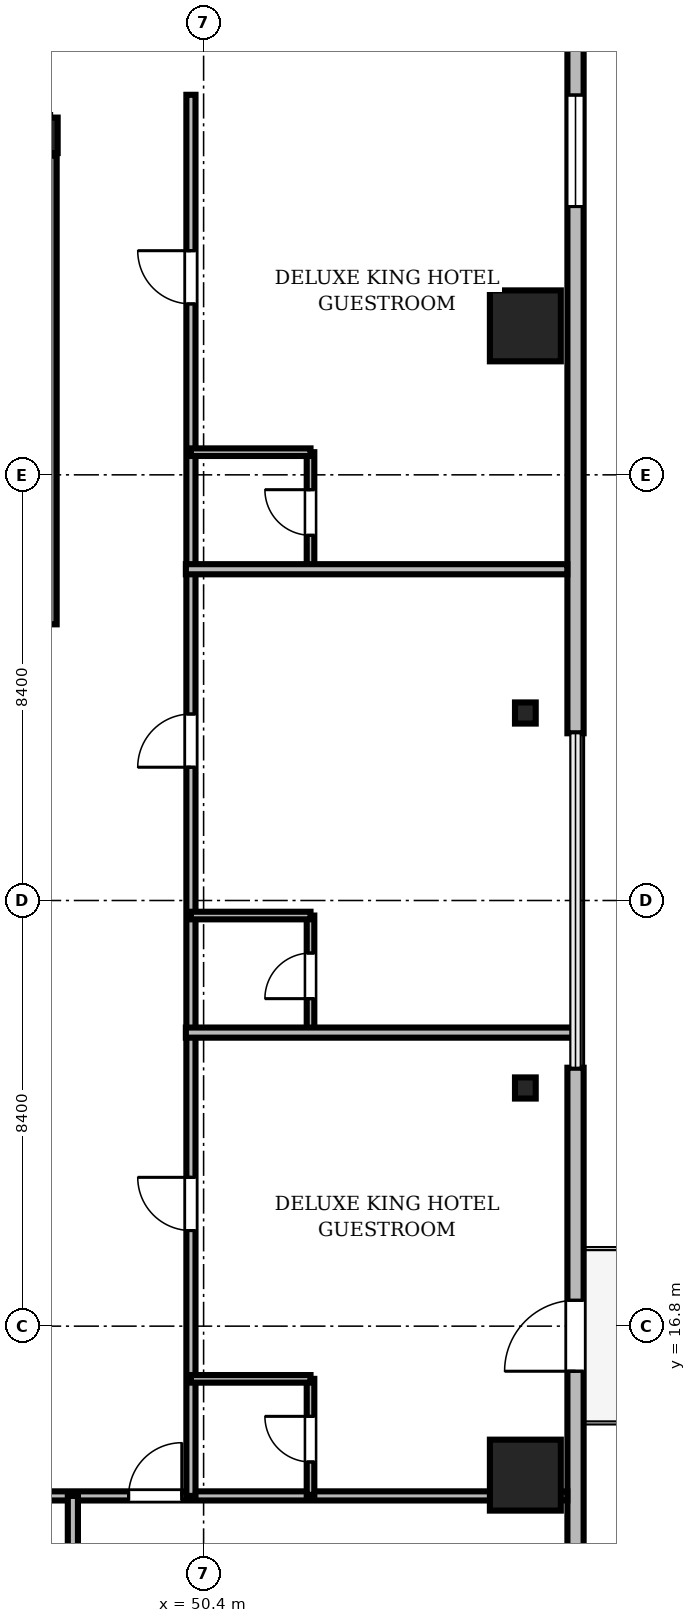
"""IFC4 building model, lengths in metres.
Left out: names, types, materials, properties, quantities, classifications, styles, units other than length and angle.
Written with IfcOpenShell. Run it as: python <this file> out.ifc"""

import sys

from ifc_helpers import new_model, si_unit, direction, frame, frame_2d, origin, origin_2d, place, context, subcontext, project, spatial, rectangle, i_section, extrude, source, transform, mapped, element, fill, save


model = new_model("IFC4")
c1 = context("Model", 3, precision=1e-05, world=origin(), true_north=direction((0.0, 1.0)))
c2 = subcontext(c1, "Body", "Model", "MODEL_VIEW")
j1 = project(units=[si_unit("LENGTHUNIT", "METRE"), si_unit("PLANEANGLEUNIT", "RADIAN")], contexts=[c1])
p1 = place(None, origin())
s1 = spatial("IfcSite", under=j1, at=p1, CompositionType="ELEMENT")
p2 = place(p1, origin())
s2 = spatial("IfcBuilding", under=s1, at=p2, CompositionType="ELEMENT")
p3 = place(p2, frame((0.0, 0.0, 207.3)))
s3 = spatial("IfcBuildingStorey", under=s2, at=p3, CompositionType="ELEMENT", Elevation=207.3)
m1 = source(origin(), c2, "Body", "SweptSolid", [
    extrude(i_section(OverallWidth=0.3, OverallDepth=0.7, WebThickness=0.017, FlangeThickness=0.032, FilletRadius=0.027, at=origin_2d()), origin(), (0.0, 0.0, 1.0), 3.53),
])
p4 = place(p3, frame((47.37, 40.3, 0.0), z_axis=(0.0, 0.0, 1.0), x_axis=(1.0, 0.0, 0.0)))
e1 = element("IfcColumn", 1, at=p4, inside=s3, PredefinedType="COLUMN", context=c2, shape_type="MappedRepresentation", body=[
    mapped(m1, transform((0.0, 0.0, 0.0), scale=1.0)),
])
m2 = source(origin(), c2, "Body", "SweptSolid", [
    extrude(rectangle(XDim=1.4, YDim=1.4, at=origin_2d()), origin(), (0.0, 0.0, 1.0), 3.53),
])
for number, where, z_axis, x_axis in (
    (2, (56.75, 13.86, 0.0), (0.0, 0.0, 1.0), (1.0, 0.0, 0.0)),
    (3, (56.75, 36.54, 0.0), (0.0, 0.0, 1.0), (1.0, 0.0, 0.0)),
):
    element("IfcColumn", number, at=place(p3, frame(where, z_axis=z_axis, x_axis=x_axis)), inside=s3, PredefinedType="COLUMN", context=c2, shape_type="MappedRepresentation", body=[
        mapped(m2, transform((0.0, 0.0, 0.0), scale=1.0)),
    ])
m3 = source(origin(), c2, "Body", "SweptSolid", [
    extrude(i_section(OverallWidth=0.409, OverallDepth=0.417, WebThickness=0.021, FlangeThickness=0.033, FilletRadius=0.015, at=origin_2d()), origin(), (0.0, 0.0, 1.0), 3.53),
])
for number, where, z_axis, x_axis in (
    (4, (56.75, 21.5, 0.0), (0.0, 0.0, 1.0), (1.0, 0.0, 0.0)),
    (5, (56.75, 28.9, 0.0), (0.0, 0.0, 1.0), (1.0, 0.0, 0.0)),
):
    element("IfcColumn", number, at=place(p3, frame(where, z_axis=z_axis, x_axis=x_axis)), inside=s3, PredefinedType="COLUMN", context=c2, shape_type="MappedRepresentation", body=[
        mapped(m3, transform((0.0, 0.0, 0.0), scale=1.0)),
    ])
m4 = source(origin(), c2, "Body", "SweptSolid", [
    extrude(rectangle(XDim=15.6, YDim=0.32, at=frame_2d((7.8, 0.0))), origin(), (0.0, 0.0, 1.0), 3.53),
])
p5 = place(p3, frame((57.74, 6.3, 0.0), z_axis=(0.0, 0.0, 1.0), x_axis=(0.0, 1.0, 0.0)))
e6 = element("IfcWall", 6, at=p5, inside=s3, PredefinedType="SOLIDWALL", context=c2, shape_type="MappedRepresentation", body=[
    mapped(m4, transform((0.0, 0.0, 0.0), scale=1.0)),
])
m5 = source(origin(), c2, "Body", "SweptSolid", [
    extrude(rectangle(XDim=1.4, YDim=2.3, at=frame_2d((0.7, 1.15))), frame((0.0, 0.17, 0.0), z_axis=(0.0, -1.0, 0.0), x_axis=(1.0, 0.0, 0.0)), (0.0, 0.0, 1.0), 0.34),
])
p6 = place(p5, frame((9.61, 0.0, 0.0)))
e7 = element("IfcOpeningElement", 7, at=p6, cuts=e6, PredefinedType="OPENING", context=c2, shape_type="MappedRepresentation", body=[
    mapped(m5, transform((0.0, 0.0, 0.0), scale=1.0)),
])
m6 = source(origin(), c2, "Body", "SweptSolid", [
    extrude(rectangle(XDim=2.2, YDim=2.4, at=frame_2d((1.1, 1.2))), frame((0.0, 0.17, 0.0), z_axis=(0.0, -1.0, 0.0), x_axis=(1.0, 0.0, 0.0)), (0.0, 0.0, 1.0), 0.34),
])
p7 = place(p5, frame((3.005, 0.0, 0.72)))
e8 = element("IfcOpeningElement", 8, at=p7, cuts=e6, PredefinedType="OPENING", context=c2, shape_type="MappedRepresentation", body=[
    mapped(m6, transform((0.0, 0.0, 0.0), scale=1.0)),
])
m7 = source(origin(), c2, "Body", "SweptSolid", [
    extrude(rectangle(XDim=15.6, YDim=0.32, at=frame_2d((7.8, 0.0))), origin(), (0.0, 0.0, 1.0), 3.53),
])
p8 = place(p3, frame((57.74, 28.5, 0.0), z_axis=(0.0, 0.0, 1.0), x_axis=(0.0, 1.0, 0.0)))
e9 = element("IfcWall", 9, at=p8, inside=s3, PredefinedType="SOLIDWALL", context=c2, shape_type="MappedRepresentation", body=[
    mapped(m7, transform((0.0, 0.0, 0.0), scale=1.0)),
])
p9 = place(p8, frame((10.395, 0.0, 0.72)))
e10 = element("IfcOpeningElement", 10, at=p9, cuts=e9, PredefinedType="OPENING", context=c2, shape_type="MappedRepresentation", body=[
    mapped(m6, transform((0.0, 0.0, 0.0), scale=1.0)),
])
m8 = source(origin(), c2, "Body", "SweptSolid", [
    extrude(rectangle(XDim=9.25, YDim=0.25, at=frame_2d((4.625, 0.0))), origin(), (0.0, 0.0, 1.0), 3.55),
])
p10 = place(p3, frame((47.375, 30.65, 0.0), z_axis=(0.0, 0.0, 1.0), x_axis=(0.0, 1.0, 0.0)))
e11 = element("IfcWall", 11, at=p10, inside=s3, PredefinedType="SOLIDWALL", context=c2, shape_type="MappedRepresentation", body=[
    mapped(m8, transform((0.0, 0.0, 0.0), scale=1.0)),
])
m9 = source(origin(), c2, "Body", "SweptSolid", [
    extrude(rectangle(XDim=46.156, YDim=0.18, at=frame_2d((23.078, 0.0))), origin(), (0.0, 0.0, 1.0), 2.772),
])
p11 = place(p3, frame((11.422, 13.45, 0.0), z_axis=(0.0, 0.0, 1.0), x_axis=(1.0, 0.0, 0.0)))
e12 = element("IfcWall", 12, at=p11, inside=s3, PredefinedType="PARTITIONING", context=c2, shape_type="MappedRepresentation", body=[
    mapped(m9, transform((0.0, 0.0, 0.0), scale=1.0)),
])
m10 = source(origin(), c2, "Body", "SweptSolid", [
    extrude(rectangle(XDim=1.05, YDim=2.2, at=frame_2d((0.525, 1.1))), frame((0.0, 0.1, 0.0), z_axis=(0.0, -1.0, 0.0), x_axis=(1.0, 0.0, 0.0)), (0.0, 0.0, 1.0), 0.2),
])
p12 = place(p11, frame((11.118, 0.0, 0.0)))
e13 = element("IfcOpeningElement", 13, at=p12, cuts=e12, PredefinedType="OPENING", context=c2, shape_type="MappedRepresentation", body=[
    mapped(m10, transform((0.0, 0.0, 0.0), scale=1.0)),
])
p13 = place(p11, frame((14.939, 0.0, 0.0)))
e14 = element("IfcOpeningElement", 14, at=p13, cuts=e12, PredefinedType="OPENING", context=c2, shape_type="MappedRepresentation", body=[
    mapped(m10, transform((0.0, 0.0, 0.0), scale=1.0)),
])
p14 = place(p11, frame((20.922, 0.0, 0.0)))
e15 = element("IfcOpeningElement", 15, at=p14, cuts=e12, PredefinedType="OPENING", context=c2, shape_type="MappedRepresentation", body=[
    mapped(m10, transform((0.0, 0.0, 0.0), scale=1.0)),
])
p15 = place(p11, frame((26.904, 0.0, 0.0)))
e16 = element("IfcOpeningElement", 16, at=p15, cuts=e12, PredefinedType="OPENING", context=c2, shape_type="MappedRepresentation", body=[
    mapped(m10, transform((0.0, 0.0, 0.0), scale=1.0)),
])
p16 = place(p11, frame((32.887, 0.0, 0.0)))
e17 = element("IfcOpeningElement", 17, at=p16, cuts=e12, PredefinedType="OPENING", context=c2, shape_type="MappedRepresentation", body=[
    mapped(m10, transform((0.0, 0.0, 0.0), scale=1.0)),
])
p17 = place(p11, frame((37.498, 0.0, 0.0)))
e18 = element("IfcOpeningElement", 18, at=p17, cuts=e12, PredefinedType="OPENING", context=c2, shape_type="MappedRepresentation", body=[
    mapped(m10, transform((0.0, 0.0, 0.0), scale=1.0)),
])
m11 = source(origin(), c2, "Body", "SweptSolid", [
    extrude(rectangle(XDim=27.65, YDim=0.18, at=frame_2d((13.825, 0.0))), origin(), (0.0, 0.0, 1.0), 2.972),
])
p18 = place(p3, frame((50.15, 13.45, 0.0), z_axis=(0.0, 0.0, 1.0), x_axis=(0.0, 1.0, 0.0)))
e19 = element("IfcWall", 19, at=p18, inside=s3, PredefinedType="PARTITIONING", context=c2, shape_type="MappedRepresentation", body=[
    mapped(m11, transform((0.0, 0.0, 0.0), scale=1.0)),
])
p19 = place(p18, frame((5.237, 0.0, 0.0)))
e20 = element("IfcOpeningElement", 20, at=p19, cuts=e19, PredefinedType="OPENING", context=c2, shape_type="MappedRepresentation", body=[
    mapped(m10, transform((0.0, 0.0, 0.0), scale=1.0)),
])
p20 = place(p18, frame((14.38, 0.0, 0.0)))
e21 = element("IfcOpeningElement", 21, at=p20, cuts=e19, PredefinedType="OPENING", context=c2, shape_type="MappedRepresentation", body=[
    mapped(m10, transform((0.0, 0.0, 0.0), scale=1.0)),
])
p21 = place(p18, frame((23.523, 0.0, 0.0)))
e22 = element("IfcOpeningElement", 22, at=p21, cuts=e19, PredefinedType="OPENING", context=c2, shape_type="MappedRepresentation", body=[
    mapped(m10, transform((0.0, 0.0, 0.0), scale=1.0)),
])
m12 = source(origin(), c2, "Body", "SweptSolid", [
    extrude(rectangle(XDim=2.29, YDim=0.15, at=frame_2d((1.145, 0.0))), origin(), (0.0, 0.0, 1.0), 2.972),
])
p22 = place(p3, frame((52.51, 13.47, 0.0), z_axis=(0.0, 0.0, 1.0), x_axis=(0.0, 1.0, 0.0)))
e23 = element("IfcWall", 23, at=p22, inside=s3, PredefinedType="PARTITIONING", context=c2, shape_type="MappedRepresentation", body=[
    mapped(m12, transform((0.0, 0.0, 0.0), scale=1.0)),
])
m13 = source(origin(), c2, "Body", "SweptSolid", [
    extrude(rectangle(XDim=0.9, YDim=2.1, at=frame_2d((0.45, 1.05))), frame((0.0, 0.085, 0.0), z_axis=(0.0, -1.0, 0.0), x_axis=(1.0, 0.0, 0.0)), (0.0, 0.0, 1.0), 0.17),
])
p23 = place(p22, frame((0.65, 0.0, 0.0)))
e24 = element("IfcOpeningElement", 24, at=p23, cuts=e23, PredefinedType="OPENING", context=c2, shape_type="MappedRepresentation", body=[
    mapped(m13, transform((0.0, 0.0, 0.0), scale=1.0)),
])
m14 = source(origin(), c2, "Body", "SweptSolid", [
    extrude(rectangle(XDim=2.29, YDim=0.15, at=frame_2d((1.145, 0.0))), origin(), (0.0, 0.0, 1.0), 3.192),
])
p24 = place(p3, frame((52.51, 22.613, 0.0), z_axis=(0.0, 0.0, 1.0), x_axis=(0.0, 1.0, 0.0)))
e25 = element("IfcWall", 25, at=p24, inside=s3, PredefinedType="PARTITIONING", context=c2, shape_type="MappedRepresentation", body=[
    mapped(m14, transform((0.0, 0.0, 0.0), scale=1.0)),
])
p25 = place(p24, frame((0.65, 0.0, 0.0)))
e26 = element("IfcOpeningElement", 26, at=p25, cuts=e25, PredefinedType="OPENING", context=c2, shape_type="MappedRepresentation", body=[
    mapped(m13, transform((0.0, 0.0, 0.0), scale=1.0)),
])
m15 = source(origin(), c2, "Body", "SweptSolid", [
    extrude(rectangle(XDim=2.29, YDim=0.15, at=frame_2d((1.145, 0.0))), origin(), (0.0, 0.0, 1.0), 3.53),
])
p26 = place(p3, frame((52.51, 31.757, 0.0), z_axis=(0.0, 0.0, 1.0), x_axis=(0.0, 1.0, 0.0)))
e27 = element("IfcWall", 27, at=p26, inside=s3, PredefinedType="PARTITIONING", context=c2, shape_type="MappedRepresentation", body=[
    mapped(m15, transform((0.0, 0.0, 0.0), scale=1.0)),
])
p27 = place(p26, frame((0.65, 0.0, 0.0)))
e28 = element("IfcOpeningElement", 28, at=p27, cuts=e27, PredefinedType="OPENING", context=c2, shape_type="MappedRepresentation", body=[
    mapped(m13, transform((0.0, 0.0, 0.0), scale=1.0)),
])
m16 = source(origin(), c2, "Body", "SweptSolid", [
    extrude(rectangle(XDim=11.328, YDim=0.2, at=frame_2d((5.664, 0.0))), origin(), (0.0, 0.0, 1.0), 2.772),
])
p28 = place(p3, frame((47.82, 2.122, 0.0), z_axis=(0.0, 0.0, 1.0), x_axis=(0.0, 1.0, 0.0)))
e29 = element("IfcWall", 29, at=p28, inside=s3, PredefinedType="PARTITIONING", context=c2, shape_type="MappedRepresentation", body=[
    mapped(m16, transform((0.0, 0.0, 0.0), scale=1.0)),
])
m17 = source(origin(), c2, "Body", "SweptSolid", [
    extrude(rectangle(XDim=7.72, YDim=0.2, at=frame_2d((3.86, 0.0))), origin(), (0.0, 0.0, 1.0), 2.772),
])
p29 = place(p3, frame((50.05, 22.593, 0.0), z_axis=(0.0, 0.0, 1.0), x_axis=(1.0, 0.0, 0.0)))
e30 = element("IfcWall", 30, at=p29, inside=s3, PredefinedType="PARTITIONING", context=c2, shape_type="MappedRepresentation", body=[
    mapped(m17, transform((0.0, 0.0, 0.0), scale=1.0)),
])
m18 = source(origin(), c2, "Body", "SweptSolid", [
    extrude(rectangle(XDim=7.528, YDim=0.2, at=frame_2d((3.764, 0.0))), origin(), (0.0, 0.0, 1.0), 2.772),
])
p30 = place(p3, frame((50.05, 31.737, 0.0), z_axis=(0.0, 0.0, 1.0), x_axis=(1.0, 0.0, 0.0)))
e31 = element("IfcWall", 31, at=p30, inside=s3, PredefinedType="PARTITIONING", context=c2, shape_type="MappedRepresentation", body=[
    mapped(m18, transform((0.0, 0.0, 0.0), scale=1.0)),
])
m19 = source(origin(), c2, "Body", "SweptSolid", [
    extrude(rectangle(XDim=2.36, YDim=0.15, at=frame_2d((1.18, 0.0))), origin(), (0.0, 0.0, 1.0), 3.53),
])
for number, where, z_axis, x_axis in (
    (32, (50.15, 15.76, 0.0), (0.0, 0.0, 1.0), (1.0, 0.0, 0.0)),
    (33, (50.15, 24.903, 0.0), (0.0, 0.0, 1.0), (1.0, 0.0, 0.0)),
    (34, (50.15, 34.047, 0.0), (0.0, 0.0, 1.0), (1.0, 0.0, 0.0)),
):
    element("IfcWall", number, at=place(p3, frame(where, z_axis=z_axis, x_axis=x_axis)), inside=s3, PredefinedType="PARTITIONING", context=c2, shape_type="MappedRepresentation", body=[
        mapped(m19, transform((0.0, 0.0, 0.0), scale=1.0)),
    ])
m20 = source(origin(), c2, "Body", "SweptSolid", [
    extrude(rectangle(XDim=1.4, YDim=2.3, at=frame_2d((0.7, 1.15))), frame((0.0, 0.025, 0.0), z_axis=(0.0, -1.0, 0.0), x_axis=(1.0, 0.0, 0.0)), (0.0, 0.0, 1.0), 0.05),
])
p31 = place(p6, frame((1.4, 0.0, 0.0), z_axis=(0.0, 0.0, 1.0), x_axis=(-1.0, 0.0, 0.0)))
e35 = element("IfcDoor", 35, at=p31, inside=s3, OperationType="DOUBLE_DOOR_SLIDING", PredefinedType="DOOR", context=c2, shape_type="MappedRepresentation", body=[
    mapped(m20, transform((0.0, 0.0, 0.0), scale=1.0)),
])
fill(e7, e35)
m21 = source(origin(), c2, "Body", "SweptSolid", [
    extrude(rectangle(XDim=2.2, YDim=2.4, at=frame_2d((1.1, 1.2))), frame((0.0, 0.03, 0.0), z_axis=(0.0, -1.0, 0.0), x_axis=(1.0, 0.0, 0.0)), (0.0, 0.0, 1.0), 0.06),
])
p32 = place(p9, origin())
e36 = element("IfcWindow", 36, at=p32, inside=s3, PartitioningType="SINGLE_PANEL", PredefinedType="WINDOW", context=c2, shape_type="MappedRepresentation", body=[
    mapped(m21, transform((0.0, 0.0, 0.0), scale=1.0)),
])
fill(e10, e36)
m22 = source(origin(), c2, "Body", "SweptSolid", [
    extrude(rectangle(XDim=1.05, YDim=2.2, at=frame_2d((0.525, 1.1))), frame((0.0, 0.025, 0.0), z_axis=(0.0, -1.0, 0.0), x_axis=(1.0, 0.0, 0.0)), (0.0, 0.0, 1.0), 0.05),
])
p33 = place(p17, origin())
e37 = element("IfcDoor", 37, at=p33, inside=s3, OperationType="SINGLE_SWING_RIGHT", PredefinedType="DOOR", context=c2, shape_type="MappedRepresentation", body=[
    mapped(m22, transform((0.0, 0.0, 0.0), scale=1.0)),
])
fill(e18, e37)
p34 = place(p19, origin())
e38 = element("IfcDoor", 38, at=p34, inside=s3, OperationType="SINGLE_SWING_RIGHT", PredefinedType="DOOR", context=c2, shape_type="MappedRepresentation", body=[
    mapped(m22, transform((0.0, 0.0, 0.0), scale=1.0)),
])
fill(e20, e38)
p35 = place(p20, origin())
e39 = element("IfcDoor", 39, at=p35, inside=s3, OperationType="SINGLE_SWING_LEFT", PredefinedType="DOOR", context=c2, shape_type="MappedRepresentation", body=[
    mapped(m22, transform((0.0, 0.0, 0.0), scale=1.0)),
])
fill(e21, e39)
p36 = place(p21, origin())
e40 = element("IfcDoor", 40, at=p36, inside=s3, OperationType="SINGLE_SWING_RIGHT", PredefinedType="DOOR", context=c2, shape_type="MappedRepresentation", body=[
    mapped(m22, transform((0.0, 0.0, 0.0), scale=1.0)),
])
fill(e22, e40)
m23 = source(origin(), c2, "Body", "SweptSolid", [
    extrude(rectangle(XDim=0.9, YDim=2.1, at=frame_2d((0.45, 1.05))), frame((0.0, 0.025, 0.0), z_axis=(0.0, -1.0, 0.0), x_axis=(1.0, 0.0, 0.0)), (0.0, 0.0, 1.0), 0.05),
])
p37 = place(p23, origin())
e41 = element("IfcDoor", 41, at=p37, inside=s3, OperationType="SINGLE_SWING_RIGHT", PredefinedType="DOOR", context=c2, shape_type="MappedRepresentation", body=[
    mapped(m23, transform((0.0, 0.0, 0.0), scale=1.0)),
])
fill(e24, e41)
p38 = place(p25, origin())
e42 = element("IfcDoor", 42, at=p38, inside=s3, OperationType="SINGLE_SWING_LEFT", PredefinedType="DOOR", context=c2, shape_type="MappedRepresentation", body=[
    mapped(m23, transform((0.0, 0.0, 0.0), scale=1.0)),
])
fill(e26, e42)
p39 = place(p27, origin())
e43 = element("IfcDoor", 43, at=p39, inside=s3, OperationType="SINGLE_SWING_RIGHT", PredefinedType="DOOR", context=c2, shape_type="MappedRepresentation", body=[
    mapped(m23, transform((0.0, 0.0, 0.0), scale=1.0)),
])
fill(e28, e43)
save(model, sys.argv[1])
